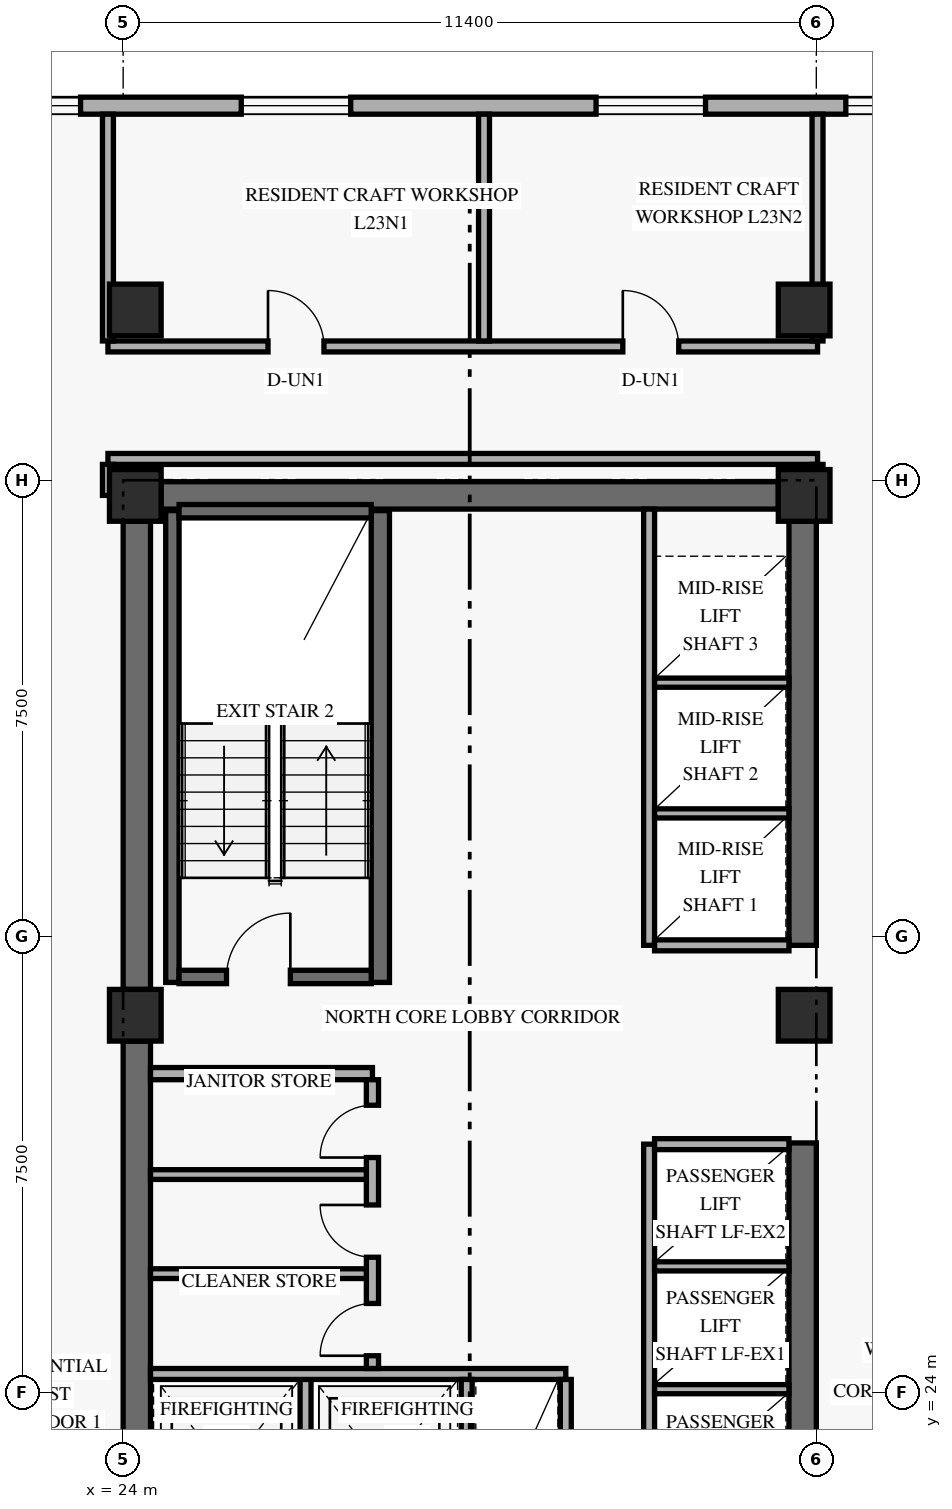
"""IFC4 building model, lengths in metres.
Left out: names, types, materials, properties, quantities, classifications, styles, units other than length and angle.
Written with IfcOpenShell. Run it as: python <this file> out.ifc"""

import sys

from ifc_helpers import new_model, si_unit, direction, frame, frame_2d, origin, origin_2d, place, context, subcontext, project, spatial, rectangle, extrude, element, fill, save


model = new_model("IFC4")
c1 = context("Model", 3, precision=1e-05, world=origin(), true_north=direction((0.0, 1.0)))
c2 = subcontext(c1, "Body", "Model", "MODEL_VIEW")
j1 = project(units=[si_unit("LENGTHUNIT", "METRE"), si_unit("PLANEANGLEUNIT", "RADIAN")], contexts=[c1])
p1 = place(None, origin())
s1 = spatial("IfcSite", under=j1, at=p1, CompositionType="ELEMENT")
p2 = place(p1, origin())
s2 = spatial("IfcBuilding", under=s1, at=p2, CompositionType="ELEMENT")
p3 = place(p2, frame((0.0, 0.0, 91.2)))
s3 = spatial("IfcBuildingStorey", under=s2, at=p3, CompositionType="ELEMENT", Elevation=91.2)
p4 = place(p3, frame((24.225, 17.975, 0.0), z_axis=(0.0, 0.0, 1.0), x_axis=(0.0, 1.0, 0.0)))
e1 = element("IfcWall", 1, at=p4, inside=s3, PredefinedType="SHEAR", context=c2, shape_type="SweptSolid", body=[
    extrude(rectangle(XDim=11.8, YDim=0.45, at=frame_2d((5.9, 0.0))), origin(), (0.0, 0.0, 1.0), 2.749),
])
p5 = place(p3, frame((24.225, 30.625, 0.0), z_axis=(0.0, 0.0, 1.0), x_axis=(0.0, 1.0, 0.0)))
e2 = element("IfcWall", 2, at=p5, inside=s3, PredefinedType="SHEAR", context=c2, shape_type="SweptSolid", body=[
    extrude(rectangle(XDim=7.7, YDim=0.45, at=frame_2d((3.85, 0.0))), origin(), (0.0, 0.0, 1.0), 2.749),
])
p6 = place(p3, frame((35.175, 17.975, 0.0), z_axis=(0.0, 0.0, 1.0), x_axis=(0.0, 1.0, 0.0)))
e3 = element("IfcWall", 3, at=p6, inside=s3, PredefinedType="SHEAR", context=c2, shape_type="SweptSolid", body=[
    extrude(rectangle(XDim=10.125, YDim=0.45, at=frame_2d((5.062, 0.0))), origin(), (0.0, 0.0, 1.0), 2.749),
])
p7 = place(p3, frame((35.175, 31.35, 0.0), z_axis=(0.0, 0.0, 1.0), x_axis=(0.0, 1.0, 0.0)))
e4 = element("IfcWall", 4, at=p7, inside=s3, PredefinedType="SHEAR", context=c2, shape_type="SweptSolid", body=[
    extrude(rectangle(XDim=6.975, YDim=0.45, at=frame_2d((3.487, 0.0))), origin(), (0.0, 0.0, 1.0), 2.749),
])
p8 = place(p3, frame((24.625, 38.75, 0.0), z_axis=(0.0, 0.0, 1.0), x_axis=(1.0, 0.0, 0.0)))
e5 = element("IfcWall", 5, at=p8, inside=s3, PredefinedType="SHEAR", context=c2, shape_type="SweptSolid", body=[
    extrude(rectangle(XDim=10.15, YDim=0.45, at=frame_2d((5.075, 0.0))), origin(), (0.0, 0.0, 1.0), 3.36),
])
p9 = place(p3, frame((24.81, 30.74, 0.0), z_axis=(0.0, 0.0, 1.0), x_axis=(0.0, 1.0, 0.0)))
e6 = element("IfcWall", 6, at=p9, inside=s3, PredefinedType="SHEAR", context=c2, shape_type="SweptSolid", body=[
    extrude(rectangle(XDim=7.76, YDim=0.22, at=frame_2d((3.88, 0.0))), origin(), (0.0, 0.0, 1.0), 3.36),
])
p10 = place(p3, frame((28.23, 30.74, 0.0), z_axis=(0.0, 0.0, 1.0), x_axis=(0.0, 1.0, 0.0)))
e7 = element("IfcWall", 7, at=p10, inside=s3, PredefinedType="SHEAR", context=c2, shape_type="SweptSolid", body=[
    extrude(rectangle(XDim=7.76, YDim=0.3, at=frame_2d((3.88, 0.0))), origin(), (0.0, 0.0, 1.0), 3.36),
])
p11 = place(p3, frame((24.92, 30.83, 0.0), z_axis=(0.0, 0.0, 1.0), x_axis=(1.0, 0.0, 0.0)))
e8 = element("IfcWall", 8, at=p11, inside=s3, PredefinedType="SHEAR", context=c2, shape_type="SweptSolid", body=[
    extrude(rectangle(XDim=3.16, YDim=0.22, at=frame_2d((1.58, 0.0))), origin(), (0.0, 0.0, 1.0), 3.36),
])
p12 = place(p11, frame((0.78, 0.0, 0.0)))
e9 = element("IfcOpeningElement", 9, at=p12, cuts=e8, PredefinedType="OPENING", context=c2, shape_type="SweptSolid", body=[
    extrude(rectangle(XDim=1.05, YDim=2.15, at=frame_2d((0.525, 1.075))), frame((0.0, 0.12, 0.0), z_axis=(0.0, -1.0, 0.0), x_axis=(1.0, 0.0, 0.0)), (0.0, 0.0, 1.0), 0.24),
])
p13 = place(p3, frame((24.92, 38.49, 0.0), z_axis=(0.0, 0.0, 1.0), x_axis=(1.0, 0.0, 0.0)))
e10 = element("IfcWall", 10, at=p13, inside=s3, PredefinedType="SHEAR", context=c2, shape_type="SweptSolid", body=[
    extrude(rectangle(XDim=3.16, YDim=0.22, at=frame_2d((1.58, 0.0))), origin(), (0.0, 0.0, 1.0), 3.36),
])
for number, where, z_axis, x_axis in (
    (11, (24.2, 30.2, 0.0), (0.0, 0.0, 1.0), (1.0, 0.0, 0.0)),
    (12, (24.2, 38.75, 0.0), (0.0, 0.0, 1.0), (1.0, 0.0, 0.0)),
    (13, (24.2, 41.8, 0.0), (0.0, 0.0, 1.0), (1.0, 0.0, 0.0)),
    (14, (35.2, 30.2, 0.0), (0.0, 0.0, 1.0), (1.0, 0.0, 0.0)),
    (15, (35.2, 38.75, 0.0), (0.0, 0.0, 1.0), (1.0, 0.0, 0.0)),
    (16, (35.2, 41.8, 0.0), (0.0, 0.0, 1.0), (1.0, 0.0, 0.0)),
):
    element("IfcColumn", number, at=place(p3, frame(where, z_axis=z_axis, x_axis=x_axis)), inside=s3, PredefinedType="COLUMN", context=c2, shape_type="SweptSolid", body=[
        extrude(rectangle(XDim=0.85, YDim=0.85, at=origin_2d()), origin(), (0.0, 0.0, 1.0), 3.6),
    ])
p14 = place(p3, frame((49.98, 45.16, 0.0), z_axis=(0.0, 0.0, 1.0), x_axis=(-1.0, 0.0, 0.0)))
e17 = element("IfcWall", 17, at=p14, inside=s3, PredefinedType="SOLIDWALL", context=c2, shape_type="SweptSolid", body=[
    extrude(rectangle(XDim=36.56, YDim=0.28, at=frame_2d((18.28, 0.0))), origin(), (0.0, 0.0, 1.0), 3.36),
])
p15 = place(p14, frame((31.545, 0.0, 0.85)))
e18 = element("IfcOpeningElement", 18, at=p15, cuts=e17, PredefinedType="OPENING", context=c2, shape_type="SweptSolid", body=[
    extrude(rectangle(XDim=1.8, YDim=1.6, at=frame_2d((0.9, 0.8))), frame((0.0, 0.15, 0.0), z_axis=(0.0, -1.0, 0.0), x_axis=(1.0, 0.0, 0.0)), (0.0, 0.0, 1.0), 0.3),
])
p16 = place(p14, frame((26.68, 0.0, 0.85)))
e19 = element("IfcOpeningElement", 19, at=p16, cuts=e17, PredefinedType="OPENING", context=c2, shape_type="SweptSolid", body=[
    extrude(rectangle(XDim=1.2, YDim=1.5, at=frame_2d((0.6, 0.75))), frame((0.0, 0.15, 0.0), z_axis=(0.0, -1.0, 0.0), x_axis=(1.0, 0.0, 0.0)), (0.0, 0.0, 1.0), 0.3),
])
p17 = place(p14, frame((22.237, 0.0, 0.85)))
e20 = element("IfcOpeningElement", 20, at=p17, cuts=e17, PredefinedType="OPENING", context=c2, shape_type="SweptSolid", body=[
    extrude(rectangle(XDim=1.8, YDim=1.6, at=frame_2d((0.9, 0.8))), frame((0.0, 0.15, 0.0), z_axis=(0.0, -1.0, 0.0), x_axis=(1.0, 0.0, 0.0)), (0.0, 0.0, 1.0), 0.3),
])
p18 = place(p14, frame((16.402, 0.0, 0.85)))
e21 = element("IfcOpeningElement", 21, at=p18, cuts=e17, PredefinedType="OPENING", context=c2, shape_type="SweptSolid", body=[
    extrude(rectangle(XDim=1.8, YDim=1.6, at=frame_2d((0.9, 0.8))), frame((0.0, 0.15, 0.0), z_axis=(0.0, -1.0, 0.0), x_axis=(1.0, 0.0, 0.0)), (0.0, 0.0, 1.0), 0.3),
])
p19 = place(p14, frame((12.895, 0.0, 0.85)))
e22 = element("IfcOpeningElement", 22, at=p19, cuts=e17, PredefinedType="OPENING", context=c2, shape_type="SweptSolid", body=[
    extrude(rectangle(XDim=1.2, YDim=1.5, at=frame_2d((0.6, 0.75))), frame((0.0, 0.15, 0.0), z_axis=(0.0, -1.0, 0.0), x_axis=(1.0, 0.0, 0.0)), (0.0, 0.0, 1.0), 0.3),
])
p20 = place(p14, frame((8.017, 0.0, 0.85)))
e23 = element("IfcOpeningElement", 23, at=p20, cuts=e17, PredefinedType="OPENING", context=c2, shape_type="SweptSolid", body=[
    extrude(rectangle(XDim=1.8, YDim=1.6, at=frame_2d((0.9, 0.8))), frame((0.0, 0.15, 0.0), z_axis=(0.0, -1.0, 0.0), x_axis=(1.0, 0.0, 0.0)), (0.0, 0.0, 1.0), 0.3),
])
p21 = place(p14, frame((1.802, 0.0, 0.85)))
e24 = element("IfcOpeningElement", 24, at=p21, cuts=e17, PredefinedType="OPENING", context=c2, shape_type="SweptSolid", body=[
    extrude(rectangle(XDim=1.8, YDim=1.6, at=frame_2d((0.9, 0.8))), frame((0.0, 0.15, 0.0), z_axis=(0.0, -1.0, 0.0), x_axis=(1.0, 0.0, 0.0)), (0.0, 0.0, 1.0), 0.3),
])
p22 = place(p3, frame((27.0, 21.19, 0.0), z_axis=(0.0, 0.0, 1.0), x_axis=(0.0, 1.0, 0.0)))
e25 = element("IfcWall", 25, at=p22, inside=s3, PredefinedType="STANDARD", context=c2, shape_type="SweptSolid", body=[
    extrude(rectangle(XDim=3.11, YDim=0.18, at=frame_2d((1.555, 0.0))), origin(), (0.0, 0.0, 1.0), 3.36),
])
p23 = place(p3, frame((24.45, 24.3, 0.0), z_axis=(0.0, 0.0, 1.0), x_axis=(1.0, 0.0, 0.0)))
e26 = element("IfcWall", 26, at=p23, inside=s3, PredefinedType="STANDARD", context=c2, shape_type="SweptSolid", body=[
    extrude(rectangle(XDim=6.83, YDim=0.18, at=frame_2d((3.415, 0.0))), origin(), (0.0, 0.0, 1.0), 3.36),
])
for number, where, z_axis, x_axis in (
    (27, (29.65, 21.19, 0.0), (0.0, 0.0, 1.0), (0.0, 1.0, 0.0)),
    (28, (31.28, 21.19, 0.0), (0.0, 0.0, 1.0), (0.0, 1.0, 0.0)),
):
    element("IfcWall", number, at=place(p3, frame(where, z_axis=z_axis, x_axis=x_axis)), inside=s3, PredefinedType="STANDARD", context=c2, shape_type="SweptSolid", body=[
        extrude(rectangle(XDim=3.02, YDim=0.18, at=frame_2d((1.51, 0.0))), origin(), (0.0, 0.0, 1.0), 3.36),
    ])
p24 = place(p3, frame((24.45, 29.24, 0.0), z_axis=(0.0, 0.0, 1.0), x_axis=(1.0, 0.0, 0.0)))
e29 = element("IfcWall", 29, at=p24, inside=s3, PredefinedType="STANDARD", context=c2, shape_type="SweptSolid", body=[
    extrude(rectangle(XDim=3.65, YDim=0.2, at=frame_2d((1.825, 0.0))), origin(), (0.0, 0.0, 1.0), 3.36),
])
p25 = place(p3, frame((28.1, 24.39, 0.0), z_axis=(0.0, 0.0, 1.0), x_axis=(0.0, 1.0, 0.0)))
e30 = element("IfcWall", 30, at=p25, inside=s3, PredefinedType="STANDARD", context=c2, shape_type="SweptSolid", body=[
    extrude(rectangle(XDim=4.75, YDim=0.2, at=frame_2d((2.375, 0.0))), origin(), (0.0, 0.0, 1.0), 3.36),
])
p26 = place(p25, frame((0.21, 0.0, 0.0)))
e31 = element("IfcOpeningElement", 31, at=p26, cuts=e30, PredefinedType="OPENING", context=c2, shape_type="SweptSolid", body=[
    extrude(rectangle(XDim=0.86, YDim=2.1, at=frame_2d((0.43, 1.05))), frame((0.0, 0.11, 0.0), z_axis=(0.0, -1.0, 0.0), x_axis=(1.0, 0.0, 0.0)), (0.0, 0.0, 1.0), 0.22),
])
p27 = place(p25, frame((1.83, 0.0, 0.0)))
e32 = element("IfcOpeningElement", 32, at=p27, cuts=e30, PredefinedType="OPENING", context=c2, shape_type="SweptSolid", body=[
    extrude(rectangle(XDim=0.86, YDim=2.1, at=frame_2d((0.43, 1.05))), frame((0.0, 0.11, 0.0), z_axis=(0.0, -1.0, 0.0), x_axis=(1.0, 0.0, 0.0)), (0.0, 0.0, 1.0), 0.22),
])
p28 = place(p25, frame((3.47, 0.0, 0.0)))
e33 = element("IfcOpeningElement", 33, at=p28, cuts=e30, PredefinedType="OPENING", context=c2, shape_type="SweptSolid", body=[
    extrude(rectangle(XDim=0.86, YDim=2.1, at=frame_2d((0.43, 1.05))), frame((0.0, 0.11, 0.0), z_axis=(0.0, -1.0, 0.0), x_axis=(1.0, 0.0, 0.0)), (0.0, 0.0, 1.0), 0.22),
])
for number, where, z_axis, x_axis in (
    (34, (24.45, 25.95, 0.0), (0.0, 0.0, 1.0), (1.0, 0.0, 0.0)),
    (35, (24.45, 27.58, 0.0), (0.0, 0.0, 1.0), (1.0, 0.0, 0.0)),
):
    element("IfcWall", number, at=place(p3, frame(where, z_axis=z_axis, x_axis=x_axis)), inside=s3, PredefinedType="PARTITIONING", context=c2, shape_type="SweptSolid", body=[
        extrude(rectangle(XDim=3.55, YDim=0.16, at=frame_2d((1.775, 0.0))), origin(), (0.0, 0.0, 1.0), 3.36),
    ])
p29 = place(p3, frame((32.65, 18.02, 0.0), z_axis=(0.0, 0.0, 1.0), x_axis=(0.0, 1.0, 0.0)))
e36 = element("IfcWall", 36, at=p29, inside=s3, PredefinedType="STANDARD", context=c2, shape_type="SweptSolid", body=[
    extrude(rectangle(XDim=10.06, YDim=0.18, at=frame_2d((5.03, 0.0))), origin(), (0.0, 0.0, 1.0), 3.36),
])
p30 = place(p3, frame((32.74, 28.08, 0.0), z_axis=(0.0, 0.0, 1.0), x_axis=(1.0, 0.0, 0.0)))
e37 = element("IfcWall", 37, at=p30, inside=s3, PredefinedType="STANDARD", context=c2, shape_type="SweptSolid", body=[
    extrude(rectangle(XDim=2.21, YDim=0.18, at=frame_2d((1.105, 0.0))), origin(), (0.0, 0.0, 1.0), 3.36),
])
for number, where, z_axis, x_axis in (
    (38, (32.74, 24.05, 0.0), (0.0, 0.0, 1.0), (1.0, 0.0, 0.0)),
    (39, (32.74, 26.07, 0.0), (0.0, 0.0, 1.0), (1.0, 0.0, 0.0)),
):
    element("IfcWall", number, at=place(p3, frame(where, z_axis=z_axis, x_axis=x_axis)), inside=s3, PredefinedType="STANDARD", context=c2, shape_type="SweptSolid", body=[
        extrude(rectangle(XDim=2.21, YDim=0.15, at=frame_2d((1.105, 0.0))), origin(), (0.0, 0.0, 1.0), 3.36),
    ])
p31 = place(p3, frame((32.65, 31.35, 0.0), z_axis=(0.0, 0.0, 1.0), x_axis=(0.0, 1.0, 0.0)))
e40 = element("IfcWall", 40, at=p31, inside=s3, PredefinedType="STANDARD", context=c2, shape_type="SweptSolid", body=[
    extrude(rectangle(XDim=7.175, YDim=0.18, at=frame_2d((3.587, 0.0))), origin(), (0.0, 0.0, 1.0), 3.36),
])
p32 = place(p3, frame((32.74, 31.35, 0.0), z_axis=(0.0, 0.0, 1.0), x_axis=(1.0, 0.0, 0.0)))
e41 = element("IfcWall", 41, at=p32, inside=s3, PredefinedType="STANDARD", context=c2, shape_type="SweptSolid", body=[
    extrude(rectangle(XDim=2.21, YDim=0.18, at=frame_2d((1.105, 0.0))), origin(), (0.0, 0.0, 1.0), 3.36),
])
for number, where, z_axis, x_axis in (
    (42, (32.74, 33.52, 0.0), (0.0, 0.0, 1.0), (1.0, 0.0, 0.0)),
    (43, (32.74, 35.67, 0.0), (0.0, 0.0, 1.0), (1.0, 0.0, 0.0)),
):
    element("IfcWall", number, at=place(p3, frame(where, z_axis=z_axis, x_axis=x_axis)), inside=s3, PredefinedType="STANDARD", context=c2, shape_type="SweptSolid", body=[
        extrude(rectangle(XDim=2.21, YDim=0.15, at=frame_2d((1.105, 0.0))), origin(), (0.0, 0.0, 1.0), 3.36),
    ])
p33 = place(p3, frame((23.75, 41.2, 0.0), z_axis=(0.0, 0.0, 1.0), x_axis=(1.0, 0.0, 0.0)))
e44 = element("IfcWall", 44, at=p33, inside=s3, PredefinedType="STANDARD", context=c2, shape_type="SweptSolid", body=[
    extrude(rectangle(XDim=11.67, YDim=0.18, at=frame_2d((5.835, 0.0))), origin(), (0.0, 0.0, 1.0), 2.731),
])
p34 = place(p33, frame((2.633, 0.0, 0.0)))
e45 = element("IfcOpeningElement", 45, at=p34, cuts=e44, PredefinedType="OPENING", context=c2, shape_type="SweptSolid", body=[
    extrude(rectangle(XDim=0.92, YDim=2.15, at=frame_2d((0.46, 1.075))), frame((0.0, 0.1, 0.0), z_axis=(0.0, -1.0, 0.0), x_axis=(1.0, 0.0, 0.0)), (0.0, 0.0, 1.0), 0.2),
])
p35 = place(p33, frame((8.468, 0.0, 0.0)))
e46 = element("IfcOpeningElement", 46, at=p35, cuts=e44, PredefinedType="OPENING", context=c2, shape_type="SweptSolid", body=[
    extrude(rectangle(XDim=0.92, YDim=2.15, at=frame_2d((0.46, 1.075))), frame((0.0, 0.1, 0.0), z_axis=(0.0, -1.0, 0.0), x_axis=(1.0, 0.0, 0.0)), (0.0, 0.0, 1.0), 0.2),
])
p36 = place(p3, frame((23.75, 39.35, 0.0), z_axis=(0.0, 0.0, 1.0), x_axis=(1.0, 0.0, 0.0)))
e47 = element("IfcWall", 47, at=p36, inside=s3, PredefinedType="STANDARD", context=c2, shape_type="SweptSolid", body=[
    extrude(rectangle(XDim=11.67, YDim=0.18, at=frame_2d((5.835, 0.0))), origin(), (0.0, 0.0, 1.0), 2.731),
])
p37 = place(p3, frame((35.42, 38.75, 0.0), z_axis=(0.0, 0.0, 1.0), x_axis=(0.0, 1.0, 0.0)))
e48 = element("IfcWall", 48, at=p37, inside=s3, PredefinedType="STANDARD", context=c2, shape_type="SweptSolid", body=[
    extrude(rectangle(XDim=0.51, YDim=0.18, at=frame_2d((0.255, 0.0))), origin(), (0.0, 0.0, 1.0), 2.731),
])
p38 = place(p3, frame((35.42, 41.29, 0.0), z_axis=(0.0, 0.0, 1.0), x_axis=(0.0, 1.0, 0.0)))
e49 = element("IfcWall", 49, at=p38, inside=s3, PredefinedType="PARTITIONING", context=c2, shape_type="SweptSolid", body=[
    extrude(rectangle(XDim=3.73, YDim=0.18, at=frame_2d((1.865, 0.0))), origin(), (0.0, 0.0, 1.0), 2.731),
])
p39 = place(p3, frame((23.75, 38.75, 0.0), z_axis=(0.0, 0.0, 1.0), x_axis=(0.0, 1.0, 0.0)))
e50 = element("IfcWall", 50, at=p39, inside=s3, PredefinedType="STANDARD", context=c2, shape_type="SweptSolid", body=[
    extrude(rectangle(XDim=0.51, YDim=0.18, at=frame_2d((0.255, 0.0))), origin(), (0.0, 0.0, 1.0), 2.731),
])
for number, where, z_axis, x_axis in (
    (51, (23.75, 41.29, 0.0), (0.0, 0.0, 1.0), (0.0, 1.0, 0.0)),
    (52, (29.935, 41.29, 0.0), (0.0, 0.0, 1.0), (0.0, 1.0, 0.0)),
):
    element("IfcWall", number, at=place(p3, frame(where, z_axis=z_axis, x_axis=x_axis)), inside=s3, PredefinedType="PARTITIONING", context=c2, shape_type="SweptSolid", body=[
        extrude(rectangle(XDim=3.73, YDim=0.18, at=frame_2d((1.865, 0.0))), origin(), (0.0, 0.0, 1.0), 2.809),
    ])
p40 = place(p16, origin())
e53 = element("IfcWindow", 53, at=p40, inside=s3, PartitioningType="SINGLE_PANEL", PredefinedType="WINDOW", context=c2, shape_type="SweptSolid", body=[
    extrude(rectangle(XDim=1.2, YDim=1.5, at=frame_2d((0.6, 0.75))), frame((0.0, 0.03, 0.0), z_axis=(0.0, -1.0, 0.0), x_axis=(1.0, 0.0, 0.0)), (0.0, 0.0, 1.0), 0.06),
])
fill(e19, e53)
p41 = place(p17, origin())
e54 = element("IfcWindow", 54, at=p41, inside=s3, PartitioningType="SINGLE_PANEL", PredefinedType="WINDOW", context=c2, shape_type="SweptSolid", body=[
    extrude(rectangle(XDim=1.8, YDim=1.6, at=frame_2d((0.9, 0.8))), frame((0.0, 0.03, 0.0), z_axis=(0.0, -1.0, 0.0), x_axis=(1.0, 0.0, 0.0)), (0.0, 0.0, 1.0), 0.06),
])
fill(e20, e54)
p42 = place(p18, origin())
e55 = element("IfcWindow", 55, at=p42, inside=s3, PartitioningType="SINGLE_PANEL", PredefinedType="WINDOW", context=c2, shape_type="SweptSolid", body=[
    extrude(rectangle(XDim=1.8, YDim=1.6, at=frame_2d((0.9, 0.8))), frame((0.0, 0.03, 0.0), z_axis=(0.0, -1.0, 0.0), x_axis=(1.0, 0.0, 0.0)), (0.0, 0.0, 1.0), 0.06),
])
fill(e21, e55)
p43 = place(p19, origin())
e56 = element("IfcWindow", 56, at=p43, inside=s3, PartitioningType="SINGLE_PANEL", PredefinedType="WINDOW", context=c2, shape_type="SweptSolid", body=[
    extrude(rectangle(XDim=1.2, YDim=1.5, at=frame_2d((0.6, 0.75))), frame((0.0, 0.03, 0.0), z_axis=(0.0, -1.0, 0.0), x_axis=(1.0, 0.0, 0.0)), (0.0, 0.0, 1.0), 0.06),
])
fill(e22, e56)
p44 = place(p12, origin())
e57 = element("IfcDoor", 57, at=p44, inside=s3, OperationType="SINGLE_SWING_RIGHT", PredefinedType="DOOR", context=c2, shape_type="SweptSolid", body=[
    extrude(rectangle(XDim=1.05, YDim=2.15, at=frame_2d((0.525, 1.075))), frame((0.0, 0.025, 0.0), z_axis=(0.0, -1.0, 0.0), x_axis=(1.0, 0.0, 0.0)), (0.0, 0.0, 1.0), 0.05),
])
fill(e9, e57)
p45 = place(p26, origin())
e58 = element("IfcDoor", 58, at=p45, inside=s3, OperationType="SINGLE_SWING_LEFT", PredefinedType="DOOR", context=c2, shape_type="SweptSolid", body=[
    extrude(rectangle(XDim=0.86, YDim=2.1, at=frame_2d((0.43, 1.05))), frame((0.0, 0.025, 0.0), z_axis=(0.0, -1.0, 0.0), x_axis=(1.0, 0.0, 0.0)), (0.0, 0.0, 1.0), 0.05),
])
fill(e31, e58)
p46 = place(p27, origin())
e59 = element("IfcDoor", 59, at=p46, inside=s3, OperationType="SINGLE_SWING_RIGHT", PredefinedType="DOOR", context=c2, shape_type="SweptSolid", body=[
    extrude(rectangle(XDim=0.86, YDim=2.1, at=frame_2d((0.43, 1.05))), frame((0.0, 0.025, 0.0), z_axis=(0.0, -1.0, 0.0), x_axis=(1.0, 0.0, 0.0)), (0.0, 0.0, 1.0), 0.05),
])
fill(e32, e59)
p47 = place(p28, origin())
e60 = element("IfcDoor", 60, at=p47, inside=s3, OperationType="SINGLE_SWING_LEFT", PredefinedType="DOOR", context=c2, shape_type="SweptSolid", body=[
    extrude(rectangle(XDim=0.86, YDim=2.1, at=frame_2d((0.43, 1.05))), frame((0.0, 0.025, 0.0), z_axis=(0.0, -1.0, 0.0), x_axis=(1.0, 0.0, 0.0)), (0.0, 0.0, 1.0), 0.05),
])
fill(e33, e60)
p48 = place(p34, origin())
e61 = element("IfcDoor", 61, at=p48, inside=s3, OperationType="SINGLE_SWING_LEFT", PredefinedType="DOOR", context=c2, shape_type="SweptSolid", body=[
    extrude(rectangle(XDim=0.92, YDim=2.15, at=frame_2d((0.46, 1.075))), frame((0.0, 0.025, 0.0), z_axis=(0.0, -1.0, 0.0), x_axis=(1.0, 0.0, 0.0)), (0.0, 0.0, 1.0), 0.05),
])
fill(e45, e61)
p49 = place(p35, origin())
e62 = element("IfcDoor", 62, at=p49, inside=s3, OperationType="SINGLE_SWING_LEFT", PredefinedType="DOOR", context=c2, shape_type="SweptSolid", body=[
    extrude(rectangle(XDim=0.92, YDim=2.15, at=frame_2d((0.46, 1.075))), frame((0.0, 0.025, 0.0), z_axis=(0.0, -1.0, 0.0), x_axis=(1.0, 0.0, 0.0)), (0.0, 0.0, 1.0), 0.05),
])
fill(e46, e62)
save(model, sys.argv[1])
